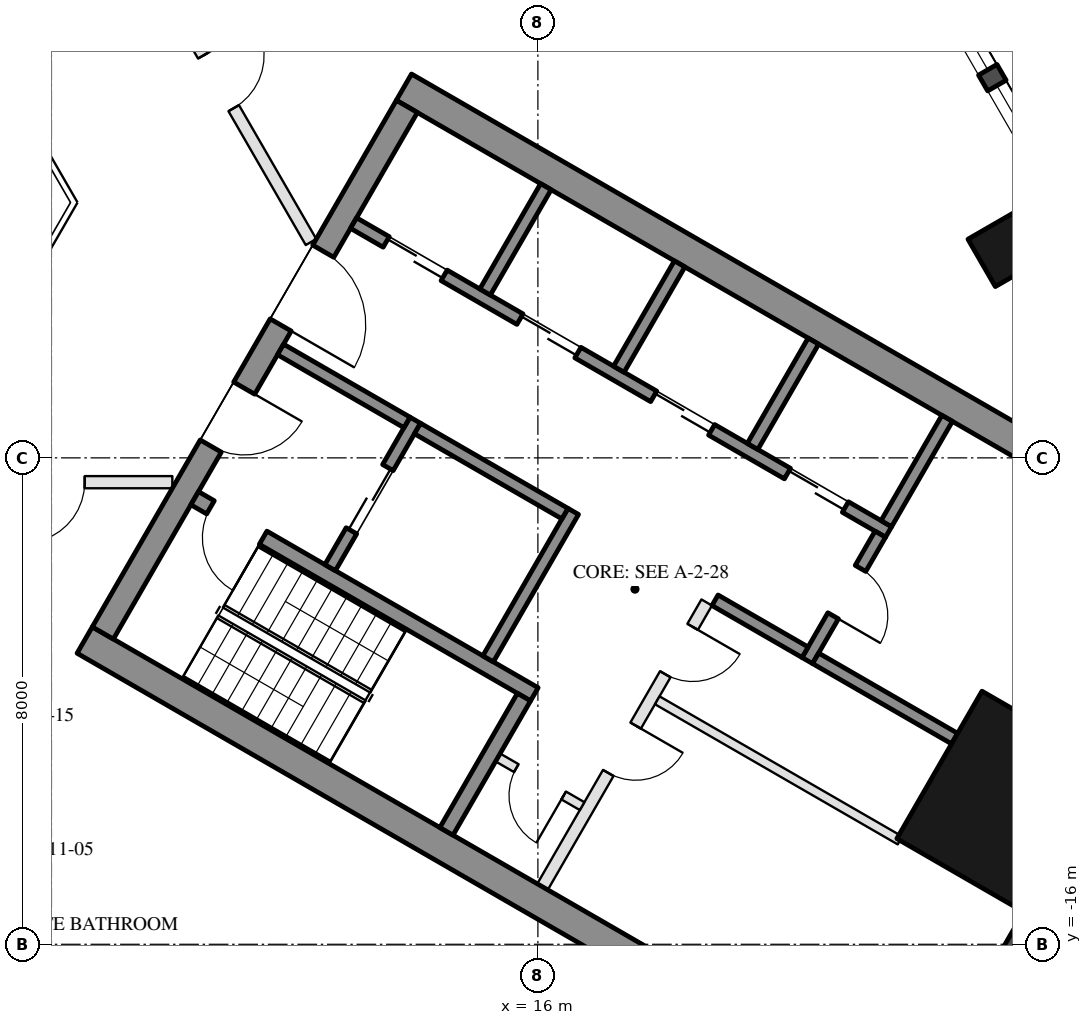
"""IFC4 building model, lengths in metres.
Left out: names, types, materials, properties, quantities, classifications, styles, units other than length and angle.
Written with IfcOpenShell. Run it as: python <this file> out.ifc"""

import sys

from ifc_helpers import new_model, si_unit, direction, frame, frame_2d, origin, origin_2d, place, context, subcontext, project, spatial, rectangle, hollow_rectangle, extrude, element, fill, save


model = new_model("IFC4")
c1 = context("Model", 3, precision=1e-05, world=origin(), true_north=direction((0.0, 1.0)))
c2 = subcontext(c1, "Body", "Model", "MODEL_VIEW")
j1 = project(units=[si_unit("LENGTHUNIT", "METRE"), si_unit("PLANEANGLEUNIT", "RADIAN")], contexts=[c1])
p1 = place(None, origin())
s1 = spatial("IfcSite", under=j1, at=p1, CompositionType="ELEMENT")
p2 = place(p1, origin())
s2 = spatial("IfcBuilding", under=s1, at=p2, CompositionType="ELEMENT")
p3 = place(p2, frame((0.0, 0.0, 124.2)))
s3 = spatial("IfcBuildingStorey", under=s2, at=p3, CompositionType="ELEMENT", Elevation=124.2)
p4 = place(p3, frame((23.688, -4.568, 0.0), z_axis=(0.0, 0.0, 1.0), x_axis=(-0.5, 0.866025403784, 0.0)))
e1 = element("IfcColumn", 1, at=p4, inside=s3, PredefinedType="COLUMN", context=c2, shape_type="SweptSolid", body=[
    extrude(hollow_rectangle(XDim=0.9, YDim=0.9, WallThickness=0.04, at=origin_2d()), origin(), (0.0, 0.0, 1.0), 3.7),
])
p5 = place(p3, frame((23.643, -13.65, 0.0), z_axis=(0.0, 0.0, 1.0), x_axis=(0.5, 0.866025403784, 0.0)))
e2 = element("IfcColumn", 2, at=p5, inside=s3, PredefinedType="COLUMN", context=c2, shape_type="SweptSolid", body=[
    extrude(hollow_rectangle(XDim=2.8, YDim=2.4, WallThickness=0.07, at=origin_2d()), origin(), (0.0, 0.0, 1.0), 3.7),
])
p6 = place(p3, frame((23.427, -16.792, 0.0), z_axis=(0.0, 0.0, 1.0), x_axis=(0.500018773155, 0.866014564827, 0.0)))
e3 = element("IfcWall", 3, at=p6, inside=s3, PredefinedType="SOLIDWALL", context=c2, shape_type="SweptSolid", body=[
    extrude(rectangle(XDim=5.658, YDim=0.35, at=frame_2d((2.829, 0.0))), origin(), (0.0, 0.0, 1.0), 3.55),
])
p7 = place(p3, frame((26.257, -6.567, 0.0), z_axis=(0.0, 0.0, 1.0), x_axis=(-0.500023526245, 0.866011820475, 0.0)))
e4 = element("IfcWall", 4, at=p7, inside=s3, PredefinedType="SOLIDWALL", context=c2, shape_type="SweptSolid", body=[
    extrude(rectangle(XDim=11.816, YDim=0.35, at=frame_2d((5.908, 0.0))), origin(), (0.0, 0.0, 1.0), 3.55),
])
p8 = place(p7, frame((0.38, 0.0, 0.3)))
e5 = element("IfcOpeningElement", 5, at=p8, cuts=e4, PredefinedType="OPENING", context=c2, shape_type="SweptSolid", body=[
    extrude(rectangle(XDim=1.8, YDim=2.65, at=frame_2d((0.9, 1.325))), frame((0.0, 0.185, 0.0), z_axis=(0.0, -1.0, 0.0), x_axis=(1.0, 0.0, 0.0)), (0.0, 0.0, 1.0), 0.37),
])
p9 = place(p7, frame((7.716, 0.0, 0.0)))
e6 = element("IfcOpeningElement", 6, at=p9, cuts=e4, PredefinedType="OPENING", context=c2, shape_type="SweptSolid", body=[
    extrude(rectangle(XDim=2.4, YDim=2.4, at=frame_2d((1.2, 1.2))), frame((0.0, 0.185, 0.0), z_axis=(0.0, -1.0, 0.0), x_axis=(1.0, 0.0, 0.0)), (0.0, 0.0, 1.0), 0.37),
])
p10 = place(p7, frame((3.816, 0.0, 0.3)))
e7 = element("IfcOpeningElement", 7, at=p10, cuts=e4, PredefinedType="OPENING", context=c2, shape_type="SweptSolid", body=[
    extrude(rectangle(XDim=1.6, YDim=2.65, at=frame_2d((0.8, 1.325))), frame((0.0, 0.185, 0.0), z_axis=(0.0, -1.0, 0.0), x_axis=(1.0, 0.0, 0.0)), (0.0, 0.0, 1.0), 0.37),
])
p11 = place(p7, frame((5.716, 0.0, 0.3)))
e8 = element("IfcOpeningElement", 8, at=p11, cuts=e4, PredefinedType="OPENING", context=c2, shape_type="SweptSolid", body=[
    extrude(rectangle(XDim=1.6, YDim=2.65, at=frame_2d((0.8, 1.325))), frame((0.0, 0.185, 0.0), z_axis=(0.0, -1.0, 0.0), x_axis=(1.0, 0.0, 0.0)), (0.0, 0.0, 1.0), 0.37),
])
for number, where, z_axis, x_axis in (
    (9, (8.547, -10.997, 0.0), (0.0, 0.0, 1.0), (0.866, -0.5, 0.0)),
    (10, (13.797, -1.903, 0.0), (0.0, 0.0, 1.0), (0.866, -0.5, 0.0)),
):
    element("IfcWall", number, at=place(p3, frame(where, z_axis=z_axis, x_axis=x_axis)), inside=s3, PredefinedType="SHEAR", context=c2, shape_type="SweptSolid", body=[
        extrude(rectangle(XDim=14.837, YDim=0.5, at=frame_2d((7.418, 0.0))), origin(), (0.0, 0.0, 1.0), 3.5),
    ])
p12 = place(p3, frame((8.845, -10.88, 0.0), z_axis=(0.0, 0.0, 1.0), x_axis=(0.500004234368, 0.866022959057, 0.0)))
e11 = element("IfcWall", 11, at=p12, inside=s3, PredefinedType="SHEAR", context=c2, shape_type="SweptSolid", body=[
    extrude(rectangle(XDim=10.0, YDim=0.4, at=frame_2d((5.0, 0.0))), origin(), (0.0, 0.0, 1.0), 3.5),
])
p13 = place(p12, frame((3.55, 0.0, 0.0)))
e12 = element("IfcOpeningElement", 12, at=p13, cuts=e11, PredefinedType="OPENING", context=c2, shape_type="SweptSolid", body=[
    extrude(rectangle(XDim=1.1, YDim=2.1, at=frame_2d((0.55, 1.05))), frame((0.0, 0.21, 0.0), z_axis=(0.0, -1.0, 0.0), x_axis=(1.0, 0.0, 0.0)), (0.0, 0.0, 1.0), 0.42),
])
p14 = place(p12, frame((5.85, 0.0, 0.0)))
e13 = element("IfcOpeningElement", 13, at=p14, cuts=e11, PredefinedType="OPENING", context=c2, shape_type="SweptSolid", body=[
    extrude(rectangle(XDim=1.4, YDim=2.1, at=frame_2d((0.7, 1.05))), frame((0.0, 0.21, 0.0), z_axis=(0.0, -1.0, 0.0), x_axis=(1.0, 0.0, 0.0)), (0.0, 0.0, 1.0), 0.42),
])
p15 = place(p3, frame((10.356, -8.664, 0.0), z_axis=(0.0, 0.0, 1.0), x_axis=(0.866028629588, -0.499994412703, 0.0)))
e14 = element("IfcWall", 14, at=p15, inside=s3, PredefinedType="SHEAR", context=c2, shape_type="SweptSolid", body=[
    extrude(rectangle(XDim=6.45, YDim=0.25, at=frame_2d((3.225, 0.0))), origin(), (0.0, 0.0, 1.0), 3.5),
])
p16 = place(p15, frame((0.3, 0.0, 0.0)))
e15 = element("IfcOpeningElement", 15, at=p16, cuts=e14, PredefinedType="OPENING", context=c2, shape_type="SweptSolid", body=[
    extrude(rectangle(XDim=1.0, YDim=2.1, at=frame_2d((0.5, 1.05))), frame((0.0, 0.135, 0.0), z_axis=(0.0, -1.0, 0.0), x_axis=(1.0, 0.0, 0.0)), (0.0, 0.0, 1.0), 0.27),
])
p17 = place(p3, frame((14.496, -14.143, 0.0), z_axis=(0.0, 0.0, 1.0), x_axis=(0.500062241894, 0.865989465428, 0.0)))
e16 = element("IfcWall", 16, at=p17, inside=s3, PredefinedType="SHEAR", context=c2, shape_type="SweptSolid", body=[
    extrude(rectangle(XDim=2.55, YDim=0.25, at=frame_2d((1.275, 0.0))), origin(), (0.0, 0.0, 1.0), 3.5),
])
p18 = place(p3, frame((15.181, -11.305, 0.0), z_axis=(0.0, 0.0, 1.0), x_axis=(0.49994636267, 0.866056369097, 0.0)))
e17 = element("IfcWall", 17, at=p18, inside=s3, PredefinedType="SHEAR", context=c2, shape_type="SweptSolid", body=[
    extrude(rectangle(XDim=2.8, YDim=0.2, at=frame_2d((1.4, 0.0))), origin(), (0.0, 0.0, 1.0), 3.5),
])
p19 = place(p3, frame((12.583, -9.805, 0.0), z_axis=(0.0, 0.0, 1.0), x_axis=(0.49994636267, 0.866056369097, 0.0)))
e18 = element("IfcWall", 18, at=p19, inside=s3, PredefinedType="SHEAR", context=c2, shape_type="SweptSolid", body=[
    extrude(rectangle(XDim=2.8, YDim=0.2, at=frame_2d((1.4, 0.0))), origin(), (0.0, 0.0, 1.0), 3.5),
])
p20 = place(p19, frame((0.7, 0.0, 0.0)))
e19 = element("IfcOpeningElement", 19, at=p20, cuts=e18, PredefinedType="OPENING", context=c2, shape_type="SweptSolid", body=[
    extrude(rectangle(XDim=1.2, YDim=2.1, at=frame_2d((0.6, 1.05))), frame((0.0, 0.11, 0.0), z_axis=(0.0, -1.0, 0.0), x_axis=(1.0, 0.0, 0.0)), (0.0, 0.0, 1.0), 0.22),
])
p21 = place(p3, frame((11.768, -6.217, 0.0), z_axis=(0.0, 0.0, 1.0), x_axis=(0.866050077142, -0.499957262057, 0.0)))
e20 = element("IfcWall", 20, at=p21, inside=s3, PredefinedType="SHEAR", context=c2, shape_type="SweptSolid", body=[
    extrude(rectangle(XDim=2.4, YDim=0.2, at=frame_2d((1.2, 0.0))), origin(), (0.0, 0.0, 1.0), 3.5),
])
p22 = place(p3, frame((14.02, -7.517, 0.0), z_axis=(0.0, 0.0, 1.0), x_axis=(0.866034573852, -0.49998411664, 0.0)))
e21 = element("IfcWall", 21, at=p22, inside=s3, PredefinedType="SHEAR", context=c2, shape_type="SweptSolid", body=[
    extrude(rectangle(XDim=2.8, YDim=0.2, at=frame_2d((1.4, 0.0))), origin(), (0.0, 0.0, 1.0), 3.5),
])
p23 = place(p3, frame((12.968, -4.138, 0.0), z_axis=(0.0, 0.0, 1.0), x_axis=(0.866028328073, -0.49999493495, 0.0)))
e22 = element("IfcWall", 22, at=p23, inside=s3, PredefinedType="SHEAR", context=c2, shape_type="SweptSolid", body=[
    extrude(rectangle(XDim=10.16, YDim=0.2, at=frame_2d((5.08, 0.0))), origin(), (0.0, 0.0, 1.0), 3.5),
])
p24 = place(p23, frame((0.62, 0.0, 0.0)))
e23 = element("IfcOpeningElement", 23, at=p24, cuts=e22, PredefinedType="OPENING", context=c2, shape_type="SweptSolid", body=[
    extrude(rectangle(XDim=1.1, YDim=2.1, at=frame_2d((0.55, 1.05))), frame((0.0, 0.11, 0.0), z_axis=(0.0, -1.0, 0.0), x_axis=(1.0, 0.0, 0.0)), (0.0, 0.0, 1.0), 0.22),
])
p25 = place(p23, frame((3.16, 0.0, 0.0)))
e24 = element("IfcOpeningElement", 24, at=p25, cuts=e22, PredefinedType="OPENING", context=c2, shape_type="SweptSolid", body=[
    extrude(rectangle(XDim=1.1, YDim=2.1, at=frame_2d((0.55, 1.05))), frame((0.0, 0.11, 0.0), z_axis=(0.0, -1.0, 0.0), x_axis=(1.0, 0.0, 0.0)), (0.0, 0.0, 1.0), 0.22),
])
p26 = place(p23, frame((5.7, 0.0, 0.0)))
e25 = element("IfcOpeningElement", 25, at=p26, cuts=e22, PredefinedType="OPENING", context=c2, shape_type="SweptSolid", body=[
    extrude(rectangle(XDim=1.1, YDim=2.1, at=frame_2d((0.55, 1.05))), frame((0.0, 0.11, 0.0), z_axis=(0.0, -1.0, 0.0), x_axis=(1.0, 0.0, 0.0)), (0.0, 0.0, 1.0), 0.22),
])
p27 = place(p23, frame((8.24, 0.0, 0.0)))
e26 = element("IfcOpeningElement", 26, at=p27, cuts=e22, PredefinedType="OPENING", context=c2, shape_type="SweptSolid", body=[
    extrude(rectangle(XDim=1.1, YDim=2.1, at=frame_2d((0.55, 1.05))), frame((0.0, 0.11, 0.0), z_axis=(0.0, -1.0, 0.0), x_axis=(1.0, 0.0, 0.0)), (0.0, 0.0, 1.0), 0.22),
])
p28 = place(p3, frame((20.43, -11.333, 0.0), z_axis=(0.0, 0.0, 1.0), x_axis=(0.500001309137, 0.866024647952, 0.0)))
e27 = element("IfcWall", 27, at=p28, inside=s3, PredefinedType="SHEAR", context=c2, shape_type="SweptSolid", body=[
    extrude(rectangle(XDim=2.4, YDim=0.2, at=frame_2d((1.2, 0.0))), origin(), (0.0, 0.0, 1.0), 3.5),
])
p29 = place(p28, frame((0.85, 0.0, 0.0)))
e28 = element("IfcOpeningElement", 28, at=p29, cuts=e27, PredefinedType="OPENING", context=c2, shape_type="SweptSolid", body=[
    extrude(rectangle(XDim=0.9, YDim=2.1, at=frame_2d((0.45, 1.05))), frame((0.0, 0.11, 0.0), z_axis=(0.0, -1.0, 0.0), x_axis=(1.0, 0.0, 0.0)), (0.0, 0.0, 1.0), 0.22),
])
p30 = place(p3, frame((18.913, -10.342, 0.0), z_axis=(0.0, 0.0, 1.0), x_axis=(0.866038183914, -0.499977863513, 0.0)))
e29 = element("IfcWall", 29, at=p30, inside=s3, PredefinedType="SHEAR", context=c2, shape_type="SweptSolid", body=[
    extrude(rectangle(XDim=1.71, YDim=0.2, at=frame_2d((0.855, 0.0))), origin(), (0.0, 0.0, 1.0), 3.5),
])
for number, where, z_axis, x_axis in (
    (30, (15.131, -5.272, 0.0), (0.0, 0.0, 1.0), (0.5, 0.866, 0.0)),
    (31, (17.331, -6.542, 0.0), (0.0, 0.0, 1.0), (0.5, 0.866, 0.0)),
    (32, (19.531, -7.812, 0.0), (0.0, 0.0, 1.0), (0.5, 0.866, 0.0)),
    (33, (21.73, -9.082, 0.0), (0.0, 0.0, 1.0), (0.5, 0.866, 0.0)),
):
    element("IfcWall", number, at=place(p3, frame(where, z_axis=z_axis, x_axis=x_axis)), inside=s3, PredefinedType="SHEAR", context=c2, shape_type="SweptSolid", body=[
        extrude(rectangle(XDim=2.0, YDim=0.2, at=frame_2d((1.0, 0.0))), origin(), (0.0, 0.0, 1.0), 3.5),
    ])
p31 = place(p3, frame((20.567, -11.297, 0.0), z_axis=(0.0, 0.0, 1.0), x_axis=(0.866060851709, -0.499938597367, 0.0)))
e34 = element("IfcWall", 34, at=p31, inside=s3, PredefinedType="SHEAR", context=c2, shape_type="SweptSolid", body=[
    extrude(rectangle(XDim=2.64, YDim=0.2, at=frame_2d((1.32, 0.0))), origin(), (0.0, 0.0, 1.0), 3.5),
])
p32 = place(p3, frame((16.076, -15.055, 0.0), z_axis=(0.0, 0.0, 1.0), x_axis=(0.499995103361, 0.866028230842, 0.0)))
e35 = element("IfcWall", 35, at=p32, inside=s3, PredefinedType="PARTITIONING", context=c2, shape_type="SweptSolid", body=[
    extrude(rectangle(XDim=5.4, YDim=0.2, at=frame_2d((2.7, 0.0))), origin(), (0.0, 0.0, 1.0), 3.5),
])
p33 = place(p32, frame((2.163, 0.0, 0.0)))
e36 = element("IfcOpeningElement", 36, at=p33, cuts=e35, PredefinedType="OPENING", context=c2, shape_type="SweptSolid", body=[
    extrude(rectangle(XDim=0.9, YDim=2.1, at=frame_2d((0.45, 1.05))), frame((0.0, 0.11, 0.0), z_axis=(0.0, -1.0, 0.0), x_axis=(1.0, 0.0, 0.0)), (0.0, 0.0, 1.0), 0.22),
])
p34 = place(p32, frame((4.038, 0.0, 0.0)))
e37 = element("IfcOpeningElement", 37, at=p34, cuts=e35, PredefinedType="OPENING", context=c2, shape_type="SweptSolid", body=[
    extrude(rectangle(XDim=0.9, YDim=2.1, at=frame_2d((0.45, 1.05))), frame((0.0, 0.11, 0.0), z_axis=(0.0, -1.0, 0.0), x_axis=(1.0, 0.0, 0.0)), (0.0, 0.0, 1.0), 0.22),
])
p35 = place(p3, frame((15.342, -12.928, 0.0), z_axis=(0.0, 0.0, 1.0), x_axis=(0.865989903783, -0.500061482766, 0.0)))
e38 = element("IfcWall", 38, at=p35, inside=s3, PredefinedType="PARTITIONING", context=c2, shape_type="SweptSolid", body=[
    extrude(rectangle(XDim=1.6, YDim=0.15, at=frame_2d((0.8, 0.0))), origin(), (0.0, 0.0, 1.0), 3.5),
])
p36 = place(p35, frame((0.35, 0.0, 0.0)))
e39 = element("IfcOpeningElement", 39, at=p36, cuts=e38, PredefinedType="OPENING", context=c2, shape_type="SweptSolid", body=[
    extrude(rectangle(XDim=0.9, YDim=2.1, at=frame_2d((0.45, 1.05))), frame((0.0, 0.085, 0.0), z_axis=(0.0, -1.0, 0.0), x_axis=(1.0, 0.0, 0.0)), (0.0, 0.0, 1.0), 0.17),
])
p37 = place(p3, frame((17.963, -11.987, 0.0), z_axis=(0.0, 0.0, 1.0), x_axis=(0.865998608524, -0.500046407882, 0.0)))
e40 = element("IfcWall", 40, at=p37, inside=s3, PredefinedType="PARTITIONING", context=c2, shape_type="SweptSolid", body=[
    extrude(rectangle(XDim=4.61, YDim=0.15, at=frame_2d((2.305, 0.0))), origin(), (0.0, 0.0, 1.0), 3.5),
])
p38 = place(p3, frame((9.988, -8.4, 0.0), z_axis=(0.0, 0.0, 1.0), x_axis=(-1.0, 0.0, 0.0)))
e41 = element("IfcWall", 41, at=p38, inside=s3, PredefinedType="PARTITIONING", context=c2, shape_type="SweptSolid", body=[
    extrude(rectangle(XDim=3.883, YDim=0.2, at=frame_2d((1.941, 0.0))), origin(), (0.0, 0.0, 1.0), 2.95),
])
p39 = place(p38, frame((1.441, 0.0, 0.0)))
e42 = element("IfcOpeningElement", 42, at=p39, cuts=e41, PredefinedType="OPENING", context=c2, shape_type="SweptSolid", body=[
    extrude(rectangle(XDim=1.0, YDim=2.1, at=frame_2d((0.5, 1.05))), frame((0.0, 0.11, 0.0), z_axis=(0.0, -1.0, 0.0), x_axis=(1.0, 0.0, 0.0)), (0.0, 0.0, 1.0), 0.22),
])
p40 = place(p3, frame((9.226, 0.819, 0.0), z_axis=(0.0, 0.0, 1.0), x_axis=(0.500031571837, -0.866007175009, 0.0)))
e43 = element("IfcWall", 43, at=p40, inside=s3, PredefinedType="PARTITIONING", context=c2, shape_type="SweptSolid", body=[
    extrude(rectangle(XDim=6.084, YDim=0.2, at=frame_2d((3.042, 0.0))), origin(), (0.0, 0.0, 1.0), 2.95),
])
p41 = place(p40, frame((2.542, 0.0, 0.0)))
e44 = element("IfcOpeningElement", 44, at=p41, cuts=e43, PredefinedType="OPENING", context=c2, shape_type="SweptSolid", body=[
    extrude(rectangle(XDim=1.0, YDim=2.1, at=frame_2d((0.5, 1.05))), frame((0.0, 0.11, 0.0), z_axis=(0.0, -1.0, 0.0), x_axis=(1.0, 0.0, 0.0)), (0.0, 0.0, 1.0), 0.22),
])
p42 = place(p10, origin())
e45 = element("IfcWindow", 45, at=p42, inside=s3, PartitioningType="SINGLE_PANEL", PredefinedType="WINDOW", context=c2, shape_type="SweptSolid", body=[
    extrude(rectangle(XDim=1.6, YDim=2.65, at=frame_2d((0.8, 1.325))), frame((0.0, 0.03, 0.0), z_axis=(0.0, -1.0, 0.0), x_axis=(1.0, 0.0, 0.0)), (0.0, 0.0, 1.0), 0.06),
])
fill(e7, e45)
p43 = place(p11, origin())
e46 = element("IfcWindow", 46, at=p43, inside=s3, PartitioningType="SINGLE_PANEL", PredefinedType="WINDOW", context=c2, shape_type="SweptSolid", body=[
    extrude(rectangle(XDim=1.6, YDim=2.65, at=frame_2d((0.8, 1.325))), frame((0.0, 0.03, 0.0), z_axis=(0.0, -1.0, 0.0), x_axis=(1.0, 0.0, 0.0)), (0.0, 0.0, 1.0), 0.06),
])
fill(e8, e46)
p44 = place(p20, origin())
e47 = element("IfcDoor", 47, at=p44, inside=s3, OperationType="DOUBLE_DOOR_SLIDING", PredefinedType="DOOR", context=c2, shape_type="SweptSolid", body=[
    extrude(rectangle(XDim=1.2, YDim=2.1, at=frame_2d((0.6, 1.05))), frame((0.0, 0.025, 0.0), z_axis=(0.0, -1.0, 0.0), x_axis=(1.0, 0.0, 0.0)), (0.0, 0.0, 1.0), 0.05),
])
fill(e19, e47)
p45 = place(p36, frame((0.9, 0.0, 0.0), z_axis=(0.0, 0.0, 1.0), x_axis=(-1.0, 0.0, 0.0)))
e48 = element("IfcDoor", 48, at=p45, inside=s3, OperationType="SINGLE_SWING_LEFT", PredefinedType="DOOR", context=c2, shape_type="SweptSolid", body=[
    extrude(rectangle(XDim=0.9, YDim=2.1, at=frame_2d((0.45, 1.05))), frame((0.0, 0.025, 0.0), z_axis=(0.0, -1.0, 0.0), x_axis=(1.0, 0.0, 0.0)), (0.0, 0.0, 1.0), 0.05),
])
fill(e39, e48)
p46 = place(p24, origin())
e49 = element("IfcDoor", 49, at=p46, inside=s3, OperationType="DOUBLE_DOOR_SLIDING", PredefinedType="DOOR", context=c2, shape_type="SweptSolid", body=[
    extrude(rectangle(XDim=1.1, YDim=2.1, at=frame_2d((0.55, 1.05))), frame((0.0, 0.025, 0.0), z_axis=(0.0, -1.0, 0.0), x_axis=(1.0, 0.0, 0.0)), (0.0, 0.0, 1.0), 0.05),
])
fill(e23, e49)
p47 = place(p25, origin())
e50 = element("IfcDoor", 50, at=p47, inside=s3, OperationType="DOUBLE_DOOR_SLIDING", PredefinedType="DOOR", context=c2, shape_type="SweptSolid", body=[
    extrude(rectangle(XDim=1.1, YDim=2.1, at=frame_2d((0.55, 1.05))), frame((0.0, 0.025, 0.0), z_axis=(0.0, -1.0, 0.0), x_axis=(1.0, 0.0, 0.0)), (0.0, 0.0, 1.0), 0.05),
])
fill(e24, e50)
p48 = place(p26, origin())
e51 = element("IfcDoor", 51, at=p48, inside=s3, OperationType="DOUBLE_DOOR_SLIDING", PredefinedType="DOOR", context=c2, shape_type="SweptSolid", body=[
    extrude(rectangle(XDim=1.1, YDim=2.1, at=frame_2d((0.55, 1.05))), frame((0.0, 0.025, 0.0), z_axis=(0.0, -1.0, 0.0), x_axis=(1.0, 0.0, 0.0)), (0.0, 0.0, 1.0), 0.05),
])
fill(e25, e51)
p49 = place(p27, origin())
e52 = element("IfcDoor", 52, at=p49, inside=s3, OperationType="DOUBLE_DOOR_SLIDING", PredefinedType="DOOR", context=c2, shape_type="SweptSolid", body=[
    extrude(rectangle(XDim=1.1, YDim=2.1, at=frame_2d((0.55, 1.05))), frame((0.0, 0.025, 0.0), z_axis=(0.0, -1.0, 0.0), x_axis=(1.0, 0.0, 0.0)), (0.0, 0.0, 1.0), 0.05),
])
fill(e26, e52)
p50 = place(p29, frame((0.9, 0.0, 0.0), z_axis=(0.0, 0.0, 1.0), x_axis=(-1.0, 0.0, 0.0)))
e53 = element("IfcDoor", 53, at=p50, inside=s3, OperationType="SINGLE_SWING_RIGHT", PredefinedType="DOOR", context=c2, shape_type="SweptSolid", body=[
    extrude(rectangle(XDim=0.9, YDim=2.1, at=frame_2d((0.45, 1.05))), frame((0.0, 0.025, 0.0), z_axis=(0.0, -1.0, 0.0), x_axis=(1.0, 0.0, 0.0)), (0.0, 0.0, 1.0), 0.05),
])
fill(e28, e53)
p51 = place(p33, frame((0.9, 0.0, 0.0), z_axis=(0.0, 0.0, 1.0), x_axis=(-1.0, 0.0, 0.0)))
e54 = element("IfcDoor", 54, at=p51, inside=s3, OperationType="SINGLE_SWING_LEFT", PredefinedType="DOOR", context=c2, shape_type="SweptSolid", body=[
    extrude(rectangle(XDim=0.9, YDim=2.1, at=frame_2d((0.45, 1.05))), frame((0.0, 0.025, 0.0), z_axis=(0.0, -1.0, 0.0), x_axis=(1.0, 0.0, 0.0)), (0.0, 0.0, 1.0), 0.05),
])
fill(e36, e54)
p52 = place(p34, frame((0.9, 0.0, 0.0), z_axis=(0.0, 0.0, 1.0), x_axis=(-1.0, 0.0, 0.0)))
e55 = element("IfcDoor", 55, at=p52, inside=s3, OperationType="SINGLE_SWING_LEFT", PredefinedType="DOOR", context=c2, shape_type="SweptSolid", body=[
    extrude(rectangle(XDim=0.9, YDim=2.1, at=frame_2d((0.45, 1.05))), frame((0.0, 0.025, 0.0), z_axis=(0.0, -1.0, 0.0), x_axis=(1.0, 0.0, 0.0)), (0.0, 0.0, 1.0), 0.05),
])
fill(e37, e55)
p53 = place(p13, frame((1.1, 0.0, 0.0), z_axis=(0.0, 0.0, 1.0), x_axis=(-1.0, 0.0, 0.0)))
e56 = element("IfcDoor", 56, at=p53, inside=s3, OperationType="SINGLE_SWING_LEFT", PredefinedType="DOOR", context=c2, shape_type="SweptSolid", body=[
    extrude(rectangle(XDim=1.1, YDim=2.1, at=frame_2d((0.55, 1.05))), frame((0.0, 0.025, 0.0), z_axis=(0.0, -1.0, 0.0), x_axis=(1.0, 0.0, 0.0)), (0.0, 0.0, 1.0), 0.05),
])
fill(e12, e56)
p54 = place(p14, frame((1.4, 0.0, 0.0), z_axis=(0.0, 0.0, 1.0), x_axis=(-1.0, 0.0, 0.0)))
e57 = element("IfcDoor", 57, at=p54, inside=s3, OperationType="DOUBLE_DOOR_SINGLE_SWING", PredefinedType="DOOR", context=c2, shape_type="SweptSolid", body=[
    extrude(rectangle(XDim=1.4, YDim=2.1, at=frame_2d((0.7, 1.05))), frame((0.0, 0.025, 0.0), z_axis=(0.0, -1.0, 0.0), x_axis=(1.0, 0.0, 0.0)), (0.0, 0.0, 1.0), 0.05),
])
fill(e13, e57)
p55 = place(p16, frame((1.0, 0.0, 0.0), z_axis=(0.0, 0.0, 1.0), x_axis=(-1.0, 0.0, 0.0)))
e58 = element("IfcDoor", 58, at=p55, inside=s3, OperationType="SINGLE_SWING_LEFT", PredefinedType="DOOR", context=c2, shape_type="SweptSolid", body=[
    extrude(rectangle(XDim=1.0, YDim=2.1, at=frame_2d((0.5, 1.05))), frame((0.0, 0.025, 0.0), z_axis=(0.0, -1.0, 0.0), x_axis=(1.0, 0.0, 0.0)), (0.0, 0.0, 1.0), 0.05),
])
fill(e15, e58)
p56 = place(p39, origin())
e59 = element("IfcDoor", 59, at=p56, inside=s3, OperationType="SINGLE_SWING_RIGHT", PredefinedType="DOOR", context=c2, shape_type="SweptSolid", body=[
    extrude(rectangle(XDim=1.0, YDim=2.1, at=frame_2d((0.5, 1.05))), frame((0.0, 0.025, 0.0), z_axis=(0.0, -1.0, 0.0), x_axis=(1.0, 0.0, 0.0)), (0.0, 0.0, 1.0), 0.05),
])
fill(e42, e59)
p57 = place(p41, origin())
e60 = element("IfcDoor", 60, at=p57, inside=s3, OperationType="SINGLE_SWING_LEFT", PredefinedType="DOOR", context=c2, shape_type="SweptSolid", body=[
    extrude(rectangle(XDim=1.0, YDim=2.1, at=frame_2d((0.5, 1.05))), frame((0.0, 0.025, 0.0), z_axis=(0.0, -1.0, 0.0), x_axis=(1.0, 0.0, 0.0)), (0.0, 0.0, 1.0), 0.05),
])
fill(e44, e60)
save(model, sys.argv[1])
